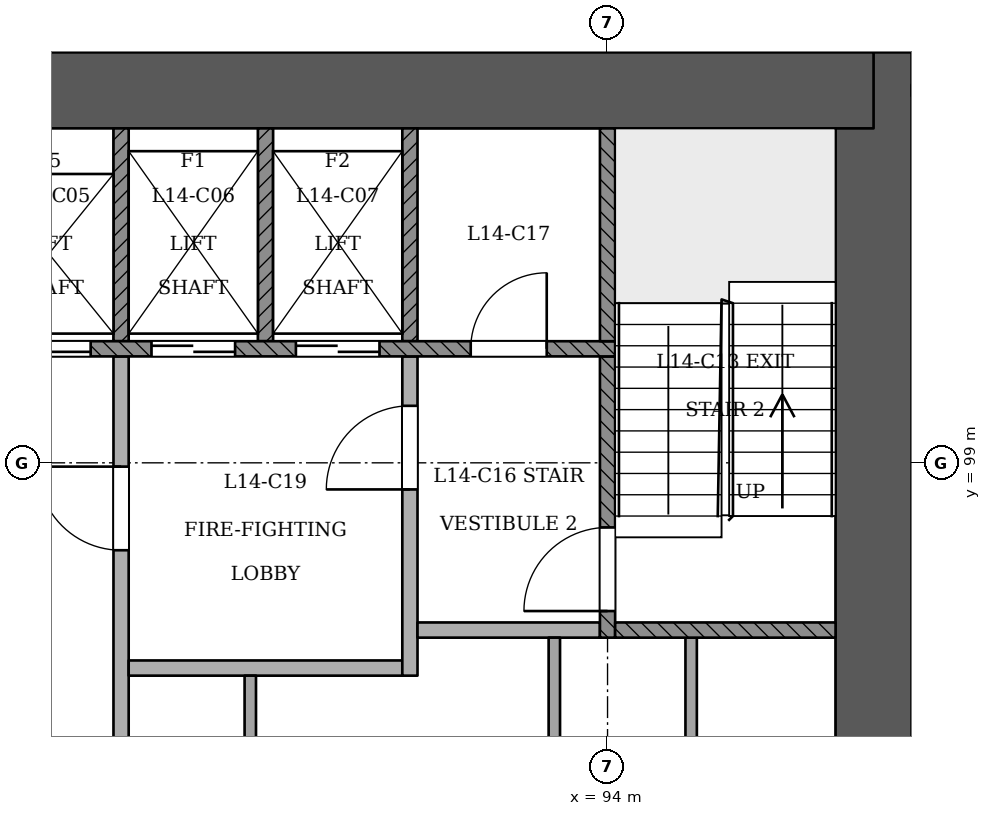
"""IFC4 building model, lengths in metres.
Left out: names, types, materials, properties, quantities, classifications, styles, units other than length and angle.
Written with IfcOpenShell. Run it as: python <this file> out.ifc"""

import sys

from ifc_helpers import new_model, si_unit, direction, frame, frame_2d, origin, place, context, subcontext, project, spatial, rectangle, extrude, element, fill, save


model = new_model("IFC4")
c1 = context("Model", 3, precision=1e-05, world=origin(), true_north=direction((0.0, 1.0)))
c2 = subcontext(c1, "Body", "Model", "MODEL_VIEW")
j1 = project(units=[si_unit("LENGTHUNIT", "METRE"), si_unit("PLANEANGLEUNIT", "RADIAN")], contexts=[c1])
p1 = place(None, origin())
s1 = spatial("IfcSite", under=j1, at=p1, CompositionType="ELEMENT")
p2 = place(p1, origin())
s2 = spatial("IfcBuilding", under=s1, at=p2, CompositionType="ELEMENT")
p3 = place(p2, frame((0.0, 0.0, 59.4)))
s3 = spatial("IfcBuildingStorey", under=s2, at=p3, CompositionType="ELEMENT", Elevation=59.4)
p4 = place(p3, frame((97.5, 92.9, 0.0), z_axis=(0.0, 0.0, 1.0), x_axis=(0.0, 1.0, 0.0)))
e1 = element("IfcWall", 1, at=p4, inside=s3, PredefinedType="SHEAR", context=c2, shape_type="SweptSolid", body=[
    extrude(rectangle(XDim=11.5, YDim=1.0, at=frame_2d((5.75, 0.0))), origin(), (0.0, 0.0, 1.0), 3.6),
])
p5 = place(p3, frame((97.5, 103.9, 0.0), z_axis=(0.0, 0.0, 1.0), x_axis=(-1.0, 0.0, 0.0)))
e2 = element("IfcWall", 2, at=p5, inside=s3, PredefinedType="SHEAR", context=c2, shape_type="SweptSolid", body=[
    extrude(rectangle(XDim=25.5, YDim=1.0, at=frame_2d((12.75, 0.0))), origin(), (0.0, 0.0, 1.0), 3.6),
])
p6 = place(p3, frame((85.931, 59.106, 0.0), z_axis=(0.0, 0.0, 1.0), x_axis=(0.499999543107, 0.866025667572, 0.0)))
e3 = element("IfcWall", 3, at=p6, inside=s3, PredefinedType="PARTITIONING", context=c2, shape_type="SweptSolid", body=[
    extrude(rectangle(XDim=43.626, YDim=0.15, at=frame_2d((21.813, 0.0))), origin(), (0.0, 0.0, 1.0), 2.7),
])
p7 = place(p6, frame((3.556, 0.0, 0.0)))
e4 = element("IfcOpeningElement", 4, at=p7, cuts=e3, PredefinedType="OPENING", context=c2, shape_type="SweptSolid", body=[
    extrude(rectangle(XDim=1.2, YDim=2.1, at=frame_2d((0.6, 1.05))), frame((0.0, 0.085, 0.0), z_axis=(0.0, -1.0, 0.0), x_axis=(1.0, 0.0, 0.0)), (0.0, 0.0, 1.0), 0.171),
])
p8 = place(p6, frame((14.463, 0.0, 0.0)))
e5 = element("IfcOpeningElement", 5, at=p8, cuts=e3, PredefinedType="OPENING", context=c2, shape_type="SweptSolid", body=[
    extrude(rectangle(XDim=1.2, YDim=2.1, at=frame_2d((0.6, 1.05))), frame((0.0, 0.085, 0.0), z_axis=(0.0, -1.0, 0.0), x_axis=(1.0, 0.0, 0.0)), (0.0, 0.0, 1.0), 0.171),
])
p9 = place(p6, frame((27.963, 0.0, 0.0)))
e6 = element("IfcOpeningElement", 6, at=p9, cuts=e3, PredefinedType="OPENING", context=c2, shape_type="SweptSolid", body=[
    extrude(rectangle(XDim=1.2, YDim=2.1, at=frame_2d((0.6, 1.05))), frame((0.0, 0.085, 0.0), z_axis=(0.0, -1.0, 0.0), x_axis=(1.0, 0.0, 0.0)), (0.0, 0.0, 1.0), 0.171),
])
p10 = place(p6, frame((38.869, 0.0, 0.0)))
e7 = element("IfcOpeningElement", 7, at=p10, cuts=e3, PredefinedType="OPENING", context=c2, shape_type="SweptSolid", body=[
    extrude(rectangle(XDim=1.2, YDim=2.1, at=frame_2d((0.6, 1.05))), frame((0.0, 0.085, 0.0), z_axis=(0.0, -1.0, 0.0), x_axis=(1.0, 0.0, 0.0)), (0.0, 0.0, 1.0), 0.171),
])
p11 = place(p3, frame((87.6, 93.4, 0.0), z_axis=(0.0, 0.0, 1.0), x_axis=(0.0, 1.0, 0.0)))
e8 = element("IfcWall", 8, at=p11, inside=s3, PredefinedType="PARTITIONING", context=c2, shape_type="SweptSolid", body=[
    extrude(rectangle(XDim=7.0, YDim=0.2, at=frame_2d((3.5, 0.0))), origin(), (0.0, 0.0, 1.0), 3.1),
])
p12 = place(p11, frame((4.45, 0.0, 0.0)))
e9 = element("IfcOpeningElement", 9, at=p12, cuts=e8, PredefinedType="OPENING", context=c2, shape_type="SweptSolid", body=[
    extrude(rectangle(XDim=1.1, YDim=2.1, at=frame_2d((0.55, 1.05))), frame((0.0, 0.11, 0.0), z_axis=(0.0, -1.0, 0.0), x_axis=(1.0, 0.0, 0.0)), (0.0, 0.0, 1.0), 0.221),
])
p13 = place(p3, frame((89.3, 93.4, 0.0), z_axis=(0.0, 0.0, 1.0), x_axis=(0.0, 1.0, 0.0)))
e10 = element("IfcWall", 10, at=p13, inside=s3, PredefinedType="PARTITIONING", context=c2, shape_type="SweptSolid", body=[
    extrude(rectangle(XDim=2.8, YDim=0.15, at=frame_2d((1.4, 0.0))), origin(), (0.0, 0.0, 1.0), 3.1),
])
for number, where, z_axis, x_axis in (
    (11, (93.3, 93.4, 0.0), (0.0, 0.0, 1.0), (0.0, 1.0, 0.0)),
    (12, (95.1, 93.4, 0.0), (0.0, 0.0, 1.0), (0.0, 1.0, 0.0)),
):
    element("IfcWall", number, at=place(p3, frame(where, z_axis=z_axis, x_axis=x_axis)), inside=s3, PredefinedType="PARTITIONING", context=c2, shape_type="SweptSolid", body=[
        extrude(rectangle(XDim=3.3, YDim=0.15, at=frame_2d((1.65, 0.0))), origin(), (0.0, 0.0, 1.0), 3.1),
    ])
p14 = place(p3, frame((87.7, 96.3, 0.0), z_axis=(0.0, 0.0, 1.0), x_axis=(1.0, 0.0, 0.0)))
e13 = element("IfcWall", 13, at=p14, inside=s3, PredefinedType="PARTITIONING", context=c2, shape_type="SweptSolid", body=[
    extrude(rectangle(XDim=3.6, YDim=0.2, at=frame_2d((1.8, 0.0))), origin(), (0.0, 0.0, 1.0), 3.1),
])
p15 = place(p3, frame((91.4, 96.2, 0.0), z_axis=(0.0, 0.0, 1.0), x_axis=(0.0, 1.0, 0.0)))
e14 = element("IfcWall", 14, at=p15, inside=s3, PredefinedType="PARTITIONING", context=c2, shape_type="SweptSolid", body=[
    extrude(rectangle(XDim=4.2, YDim=0.2, at=frame_2d((2.1, 0.0))), origin(), (0.0, 0.0, 1.0), 3.1),
])
p16 = place(p15, frame((2.45, 0.0, 0.0)))
e15 = element("IfcOpeningElement", 15, at=p16, cuts=e14, PredefinedType="OPENING", context=c2, shape_type="SweptSolid", body=[
    extrude(rectangle(XDim=1.1, YDim=2.1, at=frame_2d((0.55, 1.05))), frame((0.0, 0.11, 0.0), z_axis=(0.0, -1.0, 0.0), x_axis=(1.0, 0.0, 0.0)), (0.0, 0.0, 1.0), 0.221),
])
p17 = place(p3, frame((91.5, 96.8, 0.0), z_axis=(0.0, 0.0, 1.0), x_axis=(1.0, 0.0, 0.0)))
e16 = element("IfcWall", 16, at=p17, inside=s3, PredefinedType="PARTITIONING", context=c2, shape_type="SweptSolid", body=[
    extrude(rectangle(XDim=2.4, YDim=0.2, at=frame_2d((1.2, 0.0))), origin(), (0.0, 0.0, 1.0), 3.1),
])
p18 = place(p3, frame((94.0, 96.7, 0.0), z_axis=(0.0, 0.0, 1.0), x_axis=(0.0, 1.0, 0.0)))
e17 = element("IfcWall", 17, at=p18, inside=s3, PredefinedType="SOLIDWALL", context=c2, shape_type="SweptSolid", body=[
    extrude(rectangle(XDim=3.7, YDim=0.2, at=frame_2d((1.85, 0.0))), origin(), (0.0, 0.0, 1.0), 3.1),
])
p19 = place(p18, frame((0.35, 0.0, 0.0)))
e18 = element("IfcOpeningElement", 18, at=p19, cuts=e17, PredefinedType="OPENING", context=c2, shape_type="SweptSolid", body=[
    extrude(rectangle(XDim=1.1, YDim=2.1, at=frame_2d((0.55, 1.05))), frame((0.0, 0.11, 0.0), z_axis=(0.0, -1.0, 0.0), x_axis=(1.0, 0.0, 0.0)), (0.0, 0.0, 1.0), 0.221),
])
p20 = place(p3, frame((94.1, 96.8, 0.0), z_axis=(0.0, 0.0, 1.0), x_axis=(1.0, 0.0, 0.0)))
e19 = element("IfcWall", 19, at=p20, inside=s3, PredefinedType="SOLIDWALL", context=c2, shape_type="SweptSolid", body=[
    extrude(rectangle(XDim=2.9, YDim=0.2, at=frame_2d((1.45, 0.0))), origin(), (0.0, 0.0, 1.0), 3.1),
])
p21 = place(p3, frame((75.9, 100.5, 0.0), z_axis=(0.0, 0.0, 1.0), x_axis=(1.0, 0.0, 0.0)))
e20 = element("IfcWall", 20, at=p21, inside=s3, PredefinedType="SOLIDWALL", context=c2, shape_type="SweptSolid", body=[
    extrude(rectangle(XDim=18.2, YDim=0.2, at=frame_2d((9.1, 0.0))), origin(), (0.0, 0.0, 1.0), 3.1),
])
p22 = place(p21, frame((2.6, 0.0, 0.0)))
e21 = element("IfcOpeningElement", 21, at=p22, cuts=e20, PredefinedType="OPENING", context=c2, shape_type="SweptSolid", body=[
    extrude(rectangle(XDim=1.1, YDim=2.1, at=frame_2d((0.55, 1.05))), frame((0.0, 0.11, 0.0), z_axis=(0.0, -1.0, 0.0), x_axis=(1.0, 0.0, 0.0)), (0.0, 0.0, 1.0), 0.221),
])
p23 = place(p21, frame((4.5, 0.0, 0.0)))
e22 = element("IfcOpeningElement", 22, at=p23, cuts=e20, PredefinedType="OPENING", context=c2, shape_type="SweptSolid", body=[
    extrude(rectangle(XDim=1.1, YDim=2.1, at=frame_2d((0.55, 1.05))), frame((0.0, 0.11, 0.0), z_axis=(0.0, -1.0, 0.0), x_axis=(1.0, 0.0, 0.0)), (0.0, 0.0, 1.0), 0.221),
])
p24 = place(p21, frame((6.4, 0.0, 0.0)))
e23 = element("IfcOpeningElement", 23, at=p24, cuts=e20, PredefinedType="OPENING", context=c2, shape_type="SweptSolid", body=[
    extrude(rectangle(XDim=1.1, YDim=2.1, at=frame_2d((0.55, 1.05))), frame((0.0, 0.11, 0.0), z_axis=(0.0, -1.0, 0.0), x_axis=(1.0, 0.0, 0.0)), (0.0, 0.0, 1.0), 0.221),
])
p25 = place(p21, frame((8.3, 0.0, 0.0)))
e24 = element("IfcOpeningElement", 24, at=p25, cuts=e20, PredefinedType="OPENING", context=c2, shape_type="SweptSolid", body=[
    extrude(rectangle(XDim=1.1, YDim=2.1, at=frame_2d((0.55, 1.05))), frame((0.0, 0.11, 0.0), z_axis=(0.0, -1.0, 0.0), x_axis=(1.0, 0.0, 0.0)), (0.0, 0.0, 1.0), 0.221),
])
p26 = place(p21, frame((10.2, 0.0, 0.0)))
e25 = element("IfcOpeningElement", 25, at=p26, cuts=e20, PredefinedType="OPENING", context=c2, shape_type="SweptSolid", body=[
    extrude(rectangle(XDim=1.1, YDim=2.1, at=frame_2d((0.55, 1.05))), frame((0.0, 0.11, 0.0), z_axis=(0.0, -1.0, 0.0), x_axis=(1.0, 0.0, 0.0)), (0.0, 0.0, 1.0), 0.221),
])
p27 = place(p21, frame((12.1, 0.0, 0.0)))
e26 = element("IfcOpeningElement", 26, at=p27, cuts=e20, PredefinedType="OPENING", context=c2, shape_type="SweptSolid", body=[
    extrude(rectangle(XDim=1.1, YDim=2.1, at=frame_2d((0.55, 1.05))), frame((0.0, 0.11, 0.0), z_axis=(0.0, -1.0, 0.0), x_axis=(1.0, 0.0, 0.0)), (0.0, 0.0, 1.0), 0.221),
])
p28 = place(p21, frame((14.0, 0.0, 0.0)))
e27 = element("IfcOpeningElement", 27, at=p28, cuts=e20, PredefinedType="OPENING", context=c2, shape_type="SweptSolid", body=[
    extrude(rectangle(XDim=1.1, YDim=2.1, at=frame_2d((0.55, 1.05))), frame((0.0, 0.11, 0.0), z_axis=(0.0, -1.0, 0.0), x_axis=(1.0, 0.0, 0.0)), (0.0, 0.0, 1.0), 0.221),
])
p29 = place(p21, frame((0.65, 0.0, 0.0)))
e28 = element("IfcOpeningElement", 28, at=p29, cuts=e20, PredefinedType="OPENING", context=c2, shape_type="SweptSolid", body=[
    extrude(rectangle(XDim=1.0, YDim=2.1, at=frame_2d((0.5, 1.05))), frame((0.0, 0.11, 0.0), z_axis=(0.0, -1.0, 0.0), x_axis=(1.0, 0.0, 0.0)), (0.0, 0.0, 1.0), 0.221),
])
p30 = place(p21, frame((16.3, 0.0, 0.0)))
e29 = element("IfcOpeningElement", 29, at=p30, cuts=e20, PredefinedType="OPENING", context=c2, shape_type="SweptSolid", body=[
    extrude(rectangle(XDim=1.0, YDim=2.1, at=frame_2d((0.5, 1.05))), frame((0.0, 0.11, 0.0), z_axis=(0.0, -1.0, 0.0), x_axis=(1.0, 0.0, 0.0)), (0.0, 0.0, 1.0), 0.221),
])
for number, where, z_axis, x_axis in (
    (30, (87.6, 100.6, 0.0), (0.0, 0.0, 1.0), (0.0, 1.0, 0.0)),
    (31, (89.5, 100.6, 0.0), (0.0, 0.0, 1.0), (0.0, 1.0, 0.0)),
    (32, (91.4, 100.6, 0.0), (0.0, 0.0, 1.0), (0.0, 1.0, 0.0)),
    (33, (94.0, 100.6, 0.0), (0.0, 0.0, 1.0), (0.0, 1.0, 0.0)),
):
    element("IfcWall", number, at=place(p3, frame(where, z_axis=z_axis, x_axis=x_axis)), inside=s3, PredefinedType="SOLIDWALL", context=c2, shape_type="SweptSolid", body=[
        extrude(rectangle(XDim=2.8, YDim=0.2, at=frame_2d((1.4, 0.0))), origin(), (0.0, 0.0, 1.0), 3.1),
    ])
p31 = place(p26, origin())
e34 = element("IfcDoor", 34, at=p31, inside=s3, OperationType="SLIDING_TO_RIGHT", PredefinedType="NOTDEFINED", context=c2, shape_type="SweptSolid", body=[
    extrude(rectangle(XDim=1.1, YDim=2.1, at=frame_2d((0.55, 1.05))), frame((0.0, 0.025, 0.0), z_axis=(0.0, -1.0, 0.0), x_axis=(1.0, 0.0, 0.0)), (0.0, 0.0, 1.0), 0.05),
])
fill(e25, e34)
p32 = place(p27, origin())
e35 = element("IfcDoor", 35, at=p32, inside=s3, OperationType="SLIDING_TO_RIGHT", PredefinedType="NOTDEFINED", context=c2, shape_type="SweptSolid", body=[
    extrude(rectangle(XDim=1.1, YDim=2.1, at=frame_2d((0.55, 1.05))), frame((0.0, 0.025, 0.0), z_axis=(0.0, -1.0, 0.0), x_axis=(1.0, 0.0, 0.0)), (0.0, 0.0, 1.0), 0.05),
])
fill(e26, e35)
p33 = place(p28, origin())
e36 = element("IfcDoor", 36, at=p33, inside=s3, OperationType="SLIDING_TO_LEFT", PredefinedType="NOTDEFINED", context=c2, shape_type="SweptSolid", body=[
    extrude(rectangle(XDim=1.1, YDim=2.1, at=frame_2d((0.55, 1.05))), frame((0.0, 0.025, 0.0), z_axis=(0.0, -1.0, 0.0), x_axis=(1.0, 0.0, 0.0)), (0.0, 0.0, 1.0), 0.05),
])
fill(e27, e36)
p34 = place(p19, origin())
e37 = element("IfcDoor", 37, at=p34, inside=s3, OperationType="SINGLE_SWING_LEFT", PredefinedType="NOTDEFINED", context=c2, shape_type="SweptSolid", body=[
    extrude(rectangle(XDim=1.1, YDim=2.1, at=frame_2d((0.55, 1.05))), frame((0.0, 0.025, 0.0), z_axis=(0.0, -1.0, 0.0), x_axis=(1.0, 0.0, 0.0)), (0.0, 0.0, 1.0), 0.05),
])
fill(e18, e37)
p35 = place(p12, origin())
e38 = element("IfcDoor", 38, at=p35, inside=s3, OperationType="SINGLE_SWING_RIGHT", PredefinedType="NOTDEFINED", context=c2, shape_type="SweptSolid", body=[
    extrude(rectangle(XDim=1.1, YDim=2.1, at=frame_2d((0.55, 1.05))), frame((0.0, 0.025, 0.0), z_axis=(0.0, -1.0, 0.0), x_axis=(1.0, 0.0, 0.0)), (0.0, 0.0, 1.0), 0.05),
])
fill(e9, e38)
p36 = place(p16, origin())
e39 = element("IfcDoor", 39, at=p36, inside=s3, OperationType="SINGLE_SWING_LEFT", PredefinedType="NOTDEFINED", context=c2, shape_type="SweptSolid", body=[
    extrude(rectangle(XDim=1.1, YDim=2.1, at=frame_2d((0.55, 1.05))), frame((0.0, 0.025, 0.0), z_axis=(0.0, -1.0, 0.0), x_axis=(1.0, 0.0, 0.0)), (0.0, 0.0, 1.0), 0.05),
])
fill(e15, e39)
p37 = place(p30, origin())
e40 = element("IfcDoor", 40, at=p37, inside=s3, OperationType="SINGLE_SWING_RIGHT", PredefinedType="NOTDEFINED", context=c2, shape_type="SweptSolid", body=[
    extrude(rectangle(XDim=1.0, YDim=2.1, at=frame_2d((0.5, 1.05))), frame((0.0, 0.025, 0.0), z_axis=(0.0, -1.0, 0.0), x_axis=(1.0, 0.0, 0.0)), (0.0, 0.0, 1.0), 0.05),
])
fill(e29, e40)
save(model, sys.argv[1])
